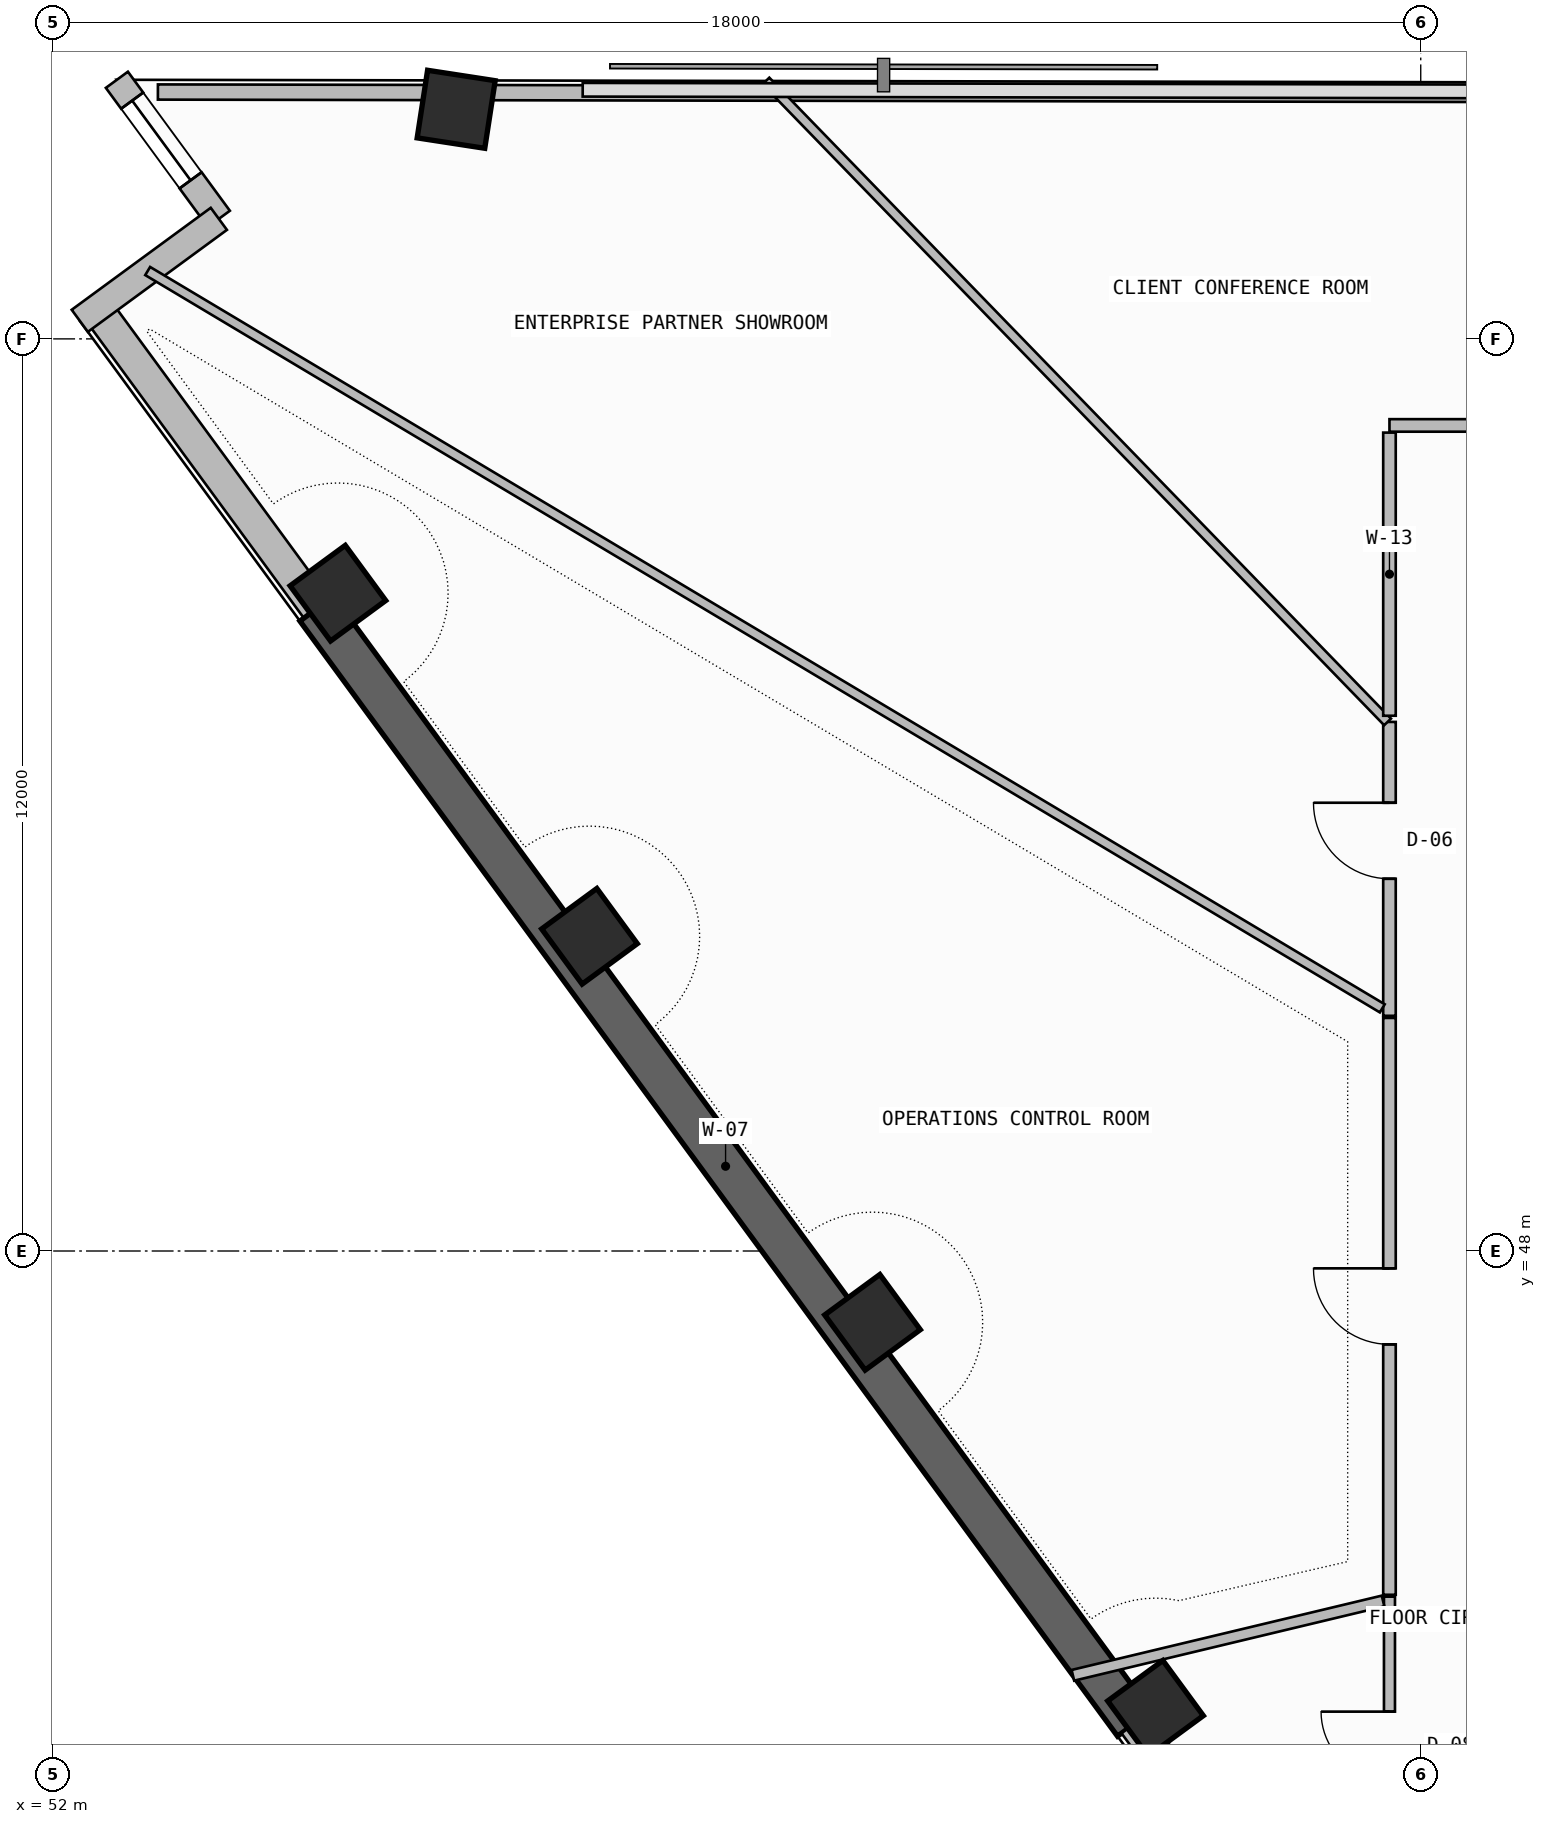
"""IFC4 building model, lengths in metres.
Left out: names, types, materials, properties, quantities, classifications, styles, units other than length and angle.
Written with IfcOpenShell. Run it as: python <this file> out.ifc"""

import sys

from ifc_helpers import new_model, si_unit, direction, frame, frame_2d, origin, origin_2d, place, context, subcontext, project, spatial, rectangle, extrude, element, fill, save


model = new_model("IFC4")
c1 = context("Model", 3, precision=1e-05, world=origin(), true_north=direction((0.0, 1.0)))
c2 = subcontext(c1, "Body", "Model", "MODEL_VIEW")
j1 = project(units=[si_unit("LENGTHUNIT", "METRE"), si_unit("PLANEANGLEUNIT", "RADIAN")], contexts=[c1])
p1 = place(None, origin())
s1 = spatial("IfcSite", under=j1, at=p1, CompositionType="ELEMENT")
p2 = place(p1, origin())
s2 = spatial("IfcBuilding", under=s1, at=p2, CompositionType="ELEMENT")
p3 = place(p2, frame((0.0, 0.0, 236.1)))
s3 = spatial("IfcBuildingStorey", under=s2, at=p3, CompositionType="ELEMENT", Elevation=236.1)
for number, where, z_axis, x_axis in (
    (1, (57.309, 63.021, 0.0), (0.0, 0.0, 1.0), (0.152, 0.988, 0.0)),
    (2, (55.753, 56.654, 0.0), (0.0, 0.0, 1.0), (-0.591, 0.806, 0.0)),
    (3, (59.063, 52.14, 0.0), (0.0, 0.0, 1.0), (-0.591, 0.806, 0.0)),
    (4, (62.787, 47.062, 0.0), (0.0, 0.0, 1.0), (-0.591, 0.806, 0.0)),
    (5, (66.51, 41.983, 0.0), (0.0, 0.0, 1.0), (-0.591, 0.806, 0.0)),
):
    element("IfcColumn", number, at=place(p3, frame(where, z_axis=z_axis, x_axis=x_axis)), inside=s3, PredefinedType="COLUMN", context=c2, shape_type="SweptSolid", body=[
        extrude(rectangle(XDim=0.9, YDim=0.9, at=origin_2d()), origin(), (0.0, 0.0, 1.0), 3.52),
    ])
p4 = place(p3, frame((52.579, 60.4, 0.0), z_axis=(0.0, 0.0, 1.0), x_axis=(0.591311800505, -0.806443026248, 0.0)))
e6 = element("IfcWall", 6, at=p4, inside=s3, PredefinedType="SOLIDWALL", context=c2, shape_type="SweptSolid", body=[
    extrude(rectangle(XDim=4.898, YDim=0.42, at=frame_2d((2.449, 0.0))), origin(), (0.0, 0.0, 1.0), 2.645),
])
p5 = place(p3, frame((55.475, 56.45, -0.26), z_axis=(0.0, 0.0, 1.0), x_axis=(0.591309555876, -0.806444672082, 0.0)))
e7 = element("IfcWall", 7, at=p5, inside=s3, PredefinedType="SHEAR", context=c2, shape_type="SweptSolid", body=[
    extrude(rectangle(XDim=18.192, YDim=0.55, at=frame_2d((9.096, 0.0))), origin(), (0.0, 0.0, 1.0), 3.52),
])
p6 = place(p3, frame((66.232, 41.779, 0.0), z_axis=(0.0, 0.0, 1.0), x_axis=(0.591309008949, -0.806445073105, 0.0)))
e8 = element("IfcWall", 8, at=p6, inside=s3, PredefinedType="SOLIDWALL", context=c2, shape_type="SweptSolid", body=[
    extrude(rectangle(XDim=8.908, YDim=0.42, at=frame_2d((4.454, 0.0))), origin(), (0.0, 0.0, 1.0), 2.645),
])
p7 = place(p6, frame((2.149, 0.0, 1.1)))
e9 = element("IfcOpeningElement", 9, at=p7, cuts=e8, PredefinedType="OPENING", context=c2, shape_type="SweptSolid", body=[
    extrude(rectangle(XDim=2.4, YDim=1.2, at=frame_2d((1.2, 0.6))), frame((0.0, 0.22, 0.0), z_axis=(0.0, -1.0, 0.0), x_axis=(1.0, 0.0, 0.0)), (0.0, 0.0, 1.0), 0.44),
])
p8 = place(p3, frame((52.845, 63.409, 0.0), z_axis=(0.0, 0.0, 1.0), x_axis=(0.591251685745, -0.806487101015, 0.0)))
e10 = element("IfcWall", 10, at=p8, inside=s3, PredefinedType="SOLIDWALL", context=c2, shape_type="SweptSolid", body=[
    extrude(rectangle(XDim=2.269, YDim=0.36, at=frame_2d((1.134, 0.0))), origin(), (0.0, 0.0, 1.0), 3.26),
])
p9 = place(p8, frame((0.34, 0.0, 0.45)))
e11 = element("IfcOpeningElement", 11, at=p9, cuts=e10, PredefinedType="OPENING", context=c2, shape_type="SweptSolid", body=[
    extrude(rectangle(XDim=1.3, YDim=2.4, at=frame_2d((0.65, 1.2))), frame((0.0, 0.19, 0.0), z_axis=(0.0, -1.0, 0.0), x_axis=(1.0, 0.0, 0.0)), (0.0, 0.0, 1.0), 0.38),
])
p10 = place(p3, frame((54.187, 61.579, 0.0), z_axis=(0.0, 0.0, 1.0), x_axis=(-0.806449475274, -0.591303005092, 0.0)))
e12 = element("IfcWall", 12, at=p10, inside=s3, PredefinedType="SOLIDWALL", context=c2, shape_type="SweptSolid", body=[
    extrude(rectangle(XDim=2.268, YDim=0.36, at=frame_2d((1.134, 0.0))), origin(), (0.0, 0.0, 1.0), 3.26),
])
p11 = place(p3, frame((83.332, 63.193, 0.0), z_axis=(0.0, 0.0, 1.0), x_axis=(-0.999998363757, 0.001809000383, 0.0)))
e13 = element("IfcWall", 13, at=p11, inside=s3, PredefinedType="PARAPET", context=c2, shape_type="SweptSolid", body=[
    extrude(rectangle(XDim=25.777, YDim=0.2, at=frame_2d((12.889, 0.0))), origin(), (0.0, 0.0, 1.0), 1.15),
])
p12 = place(p3, frame((57.064, 63.241, 0.0), z_axis=(0.0, 0.0, 1.0), x_axis=(-0.999998274159, 0.001857869529, 0.0)))
e14 = element("IfcWall", 14, at=p12, inside=s3, PredefinedType="PARAPET", context=c2, shape_type="SweptSolid", body=[
    extrude(rectangle(XDim=3.679, YDim=0.2, at=frame_2d((1.84, 0.0))), origin(), (0.0, 0.0, 1.0), 1.15),
])
p13 = place(p3, frame((69.589, 43.453, 0.0), z_axis=(0.0, 0.0, 1.0), x_axis=(0.0, -1.0, 0.0)))
e15 = element("IfcWall", 15, at=p13, inside=s3, PredefinedType="PARTITIONING", context=c2, shape_type="SweptSolid", body=[
    extrude(rectangle(XDim=3.925, YDim=0.145, at=frame_2d((1.963, 0.0))), origin(), (0.0, 0.0, 1.0), 3.26),
])
p14 = place(p13, frame((1.513, 0.0, 0.0)))
e16 = element("IfcOpeningElement", 16, at=p14, cuts=e15, PredefinedType="OPENING", context=c2, shape_type="SweptSolid", body=[
    extrude(rectangle(XDim=0.9, YDim=2.1, at=frame_2d((0.45, 1.05))), frame((0.0, 0.083, 0.0), z_axis=(0.0, -1.0, 0.0), x_axis=(1.0, 0.0, 0.0)), (0.0, 0.0, 1.0), 0.165),
])
p15 = place(p3, frame((65.423, 42.418, 0.0), z_axis=(0.0, 0.0, 1.0), x_axis=(0.972477530302, 0.232996680358, 0.0)))
e17 = element("IfcWall", 17, at=p15, inside=s3, PredefinedType="PARTITIONING", context=c2, shape_type="SweptSolid", body=[
    extrude(rectangle(XDim=4.197, YDim=0.145, at=frame_2d((2.098, 0.0))), origin(), (0.0, 0.0, 1.0), 2.645),
])
p16 = place(p3, frame((69.589, 54.961, 0.0), z_axis=(0.0, 0.0, 1.0), x_axis=(0.0, -1.0, 0.0)))
e18 = element("IfcWall", 18, at=p16, inside=s3, PredefinedType="PARTITIONING", context=c2, shape_type="SweptSolid", body=[
    extrude(rectangle(XDim=3.866, YDim=0.165, at=frame_2d((1.933, 0.0))), origin(), (0.0, 0.0, 1.0), 2.745),
])
p17 = place(p16, frame((1.063, 0.0, 0.0)))
e19 = element("IfcOpeningElement", 19, at=p17, cuts=e18, PredefinedType="OPENING", context=c2, shape_type="SweptSolid", body=[
    extrude(rectangle(XDim=1.0, YDim=2.2, at=frame_2d((0.5, 1.1))), frame((0.0, 0.093, 0.0), z_axis=(0.0, -1.0, 0.0), x_axis=(1.0, 0.0, 0.0)), (0.0, 0.0, 1.0), 0.185),
])
p18 = place(p3, frame((61.385, 63.393, 0.0), z_axis=(0.0, 0.0, 1.0), x_axis=(0.696238655878, -0.717810374724, 0.0)))
e20 = element("IfcWall", 20, at=p18, inside=s3, PredefinedType="PARTITIONING", context=c2, shape_type="SweptSolid", body=[
    extrude(rectangle(XDim=11.748, YDim=0.125, at=frame_2d((5.874, 0.0))), origin(), (0.0, 0.0, 1.0), 2.745),
])
p19 = place(p3, frame((69.494, 51.192, 0.0), z_axis=(0.0, 0.0, 1.0), x_axis=(-0.858567015672, 0.512701355177, 0.0)))
e21 = element("IfcWall", 21, at=p19, inside=s3, PredefinedType="PARTITIONING", context=c2, shape_type="SweptSolid", body=[
    extrude(rectangle(XDim=18.92, YDim=0.125, at=frame_2d((9.46, 0.0))), origin(), (0.0, 0.0, 1.0), 2.645),
])
p20 = place(p3, frame((75.06, 58.861, 0.0), z_axis=(0.0, 0.0, 1.0), x_axis=(-1.0, 0.0, 0.0)))
e22 = element("IfcWall", 22, at=p20, inside=s3, PredefinedType="PARTITIONING", context=c2, shape_type="SweptSolid", body=[
    extrude(rectangle(XDim=5.471, YDim=0.165, at=frame_2d((2.735, 0.0))), origin(), (0.0, 0.0, 1.0), 3.26),
])
p21 = place(p20, frame((2.236, 0.0, 0.0)))
e23 = element("IfcOpeningElement", 23, at=p21, cuts=e22, PredefinedType="OPENING", context=c2, shape_type="SweptSolid", body=[
    extrude(rectangle(XDim=1.0, YDim=2.2, at=frame_2d((0.5, 1.1))), frame((0.0, 0.093, 0.0), z_axis=(0.0, -1.0, 0.0), x_axis=(1.0, 0.0, 0.0)), (0.0, 0.0, 1.0), 0.185),
])
p22 = place(p3, frame((69.589, 58.767, 0.0), z_axis=(0.0, 0.0, 1.0), x_axis=(0.0, -1.0, 0.0)))
e24 = element("IfcWall", 24, at=p22, inside=s3, PredefinedType="PARTITIONING", context=c2, shape_type="SweptSolid", body=[
    extrude(rectangle(XDim=3.725, YDim=0.165, at=frame_2d((1.862, 0.0))), origin(), (0.0, 0.0, 1.0), 2.745),
])
p23 = place(p3, frame((69.589, 51.066, 0.0), z_axis=(0.0, 0.0, 1.0), x_axis=(0.0, -1.0, 0.0)))
e25 = element("IfcWall", 25, at=p23, inside=s3, PredefinedType="PARTITIONING", context=c2, shape_type="SweptSolid", body=[
    extrude(rectangle(XDim=7.589, YDim=0.165, at=frame_2d((3.794, 0.0))), origin(), (0.0, 0.0, 1.0), 2.745),
])
p24 = place(p23, frame((3.294, 0.0, 0.0)))
e26 = element("IfcOpeningElement", 26, at=p24, cuts=e25, PredefinedType="OPENING", context=c2, shape_type="SweptSolid", body=[
    extrude(rectangle(XDim=1.0, YDim=2.2, at=frame_2d((0.5, 1.1))), frame((0.0, 0.093, 0.0), z_axis=(0.0, -1.0, 0.0), x_axis=(1.0, 0.0, 0.0)), (0.0, 0.0, 1.0), 0.185),
])
p25 = place(p9, origin())
e27 = element("IfcWindow", 27, at=p25, inside=s3, PartitioningType="SINGLE_PANEL", PredefinedType="WINDOW", context=c2, shape_type="SweptSolid", body=[
    extrude(rectangle(XDim=1.3, YDim=2.4, at=frame_2d((0.65, 1.2))), frame((0.0, 0.03, 0.0), z_axis=(0.0, -1.0, 0.0), x_axis=(1.0, 0.0, 0.0)), (0.0, 0.0, 1.0), 0.06),
])
fill(e11, e27)
p26 = place(p14, frame((0.9, 0.0, 0.0), z_axis=(0.0, 0.0, 1.0), x_axis=(-1.0, 0.0, 0.0)))
e28 = element("IfcDoor", 28, at=p26, inside=s3, OperationType="SINGLE_SWING_RIGHT", PredefinedType="DOOR", context=c2, shape_type="SweptSolid", body=[
    extrude(rectangle(XDim=0.9, YDim=2.1, at=frame_2d((0.45, 1.05))), frame((0.0, 0.025, 0.0), z_axis=(0.0, -1.0, 0.0), x_axis=(1.0, 0.0, 0.0)), (0.0, 0.0, 1.0), 0.05),
])
fill(e16, e28)
p27 = place(p17, frame((1.0, 0.0, 0.0), z_axis=(0.0, 0.0, 1.0), x_axis=(-1.0, 0.0, 0.0)))
e29 = element("IfcDoor", 29, at=p27, inside=s3, OperationType="SINGLE_SWING_RIGHT", PredefinedType="DOOR", context=c2, shape_type="SweptSolid", body=[
    extrude(rectangle(XDim=1.0, YDim=2.2, at=frame_2d((0.5, 1.1))), frame((0.0, 0.025, 0.0), z_axis=(0.0, -1.0, 0.0), x_axis=(1.0, 0.0, 0.0)), (0.0, 0.0, 1.0), 0.05),
])
fill(e19, e29)
p28 = place(p24, frame((1.0, 0.0, 0.0), z_axis=(0.0, 0.0, 1.0), x_axis=(-1.0, 0.0, 0.0)))
e30 = element("IfcDoor", 30, at=p28, inside=s3, OperationType="SINGLE_SWING_RIGHT", PredefinedType="DOOR", context=c2, shape_type="SweptSolid", body=[
    extrude(rectangle(XDim=1.0, YDim=2.2, at=frame_2d((0.5, 1.1))), frame((0.0, 0.025, 0.0), z_axis=(0.0, -1.0, 0.0), x_axis=(1.0, 0.0, 0.0)), (0.0, 0.0, 1.0), 0.05),
])
fill(e26, e30)
save(model, sys.argv[1])
